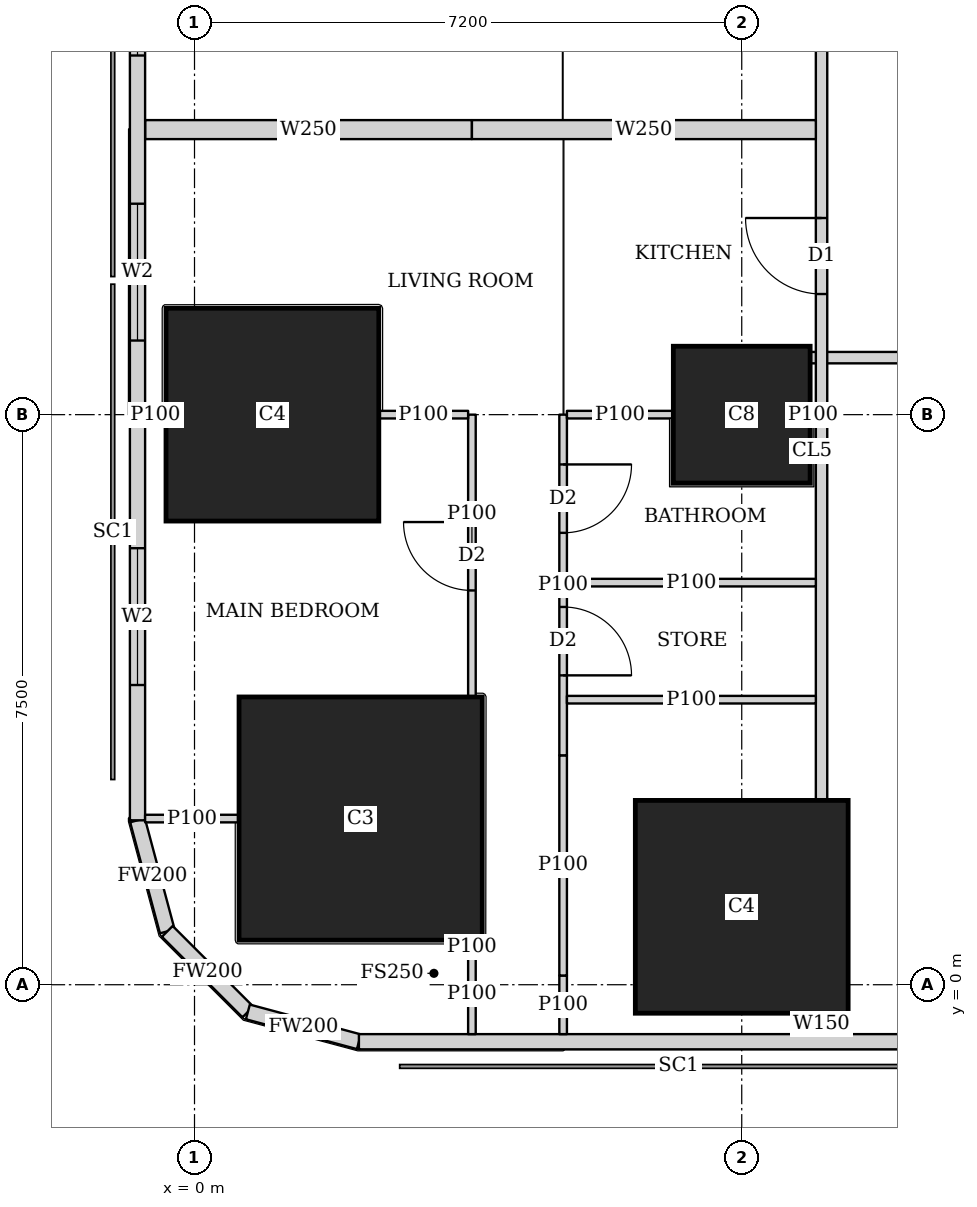
"""IFC4 building model, lengths in metres.
Left out: names, types, materials, properties, quantities, classifications, styles, units other than length and angle.
Written with IfcOpenShell. Run it as: python <this file> out.ifc"""

import sys

from ifc_helpers import new_model, si_unit, direction, frame, frame_2d, origin, origin_2d, place, context, subcontext, project, spatial, rectangle, extrude, element, fill, save


model = new_model("IFC4")
c1 = context("Model", 3, precision=1e-05, world=origin(), true_north=direction((0.0, 1.0)))
c2 = subcontext(c1, "Body", "Model", "MODEL_VIEW")
j1 = project(units=[si_unit("LENGTHUNIT", "METRE"), si_unit("PLANEANGLEUNIT", "RADIAN")], contexts=[c1])
p1 = place(None, origin())
s1 = spatial("IfcSite", under=j1, at=p1, CompositionType="ELEMENT")
p2 = place(p1, origin())
s2 = spatial("IfcBuilding", under=s1, at=p2, CompositionType="ELEMENT")
p3 = place(p2, frame((0.0, 0.0, 53.75)))
s3 = spatial("IfcBuildingStorey", under=s2, at=p3, CompositionType="ELEMENT", Elevation=53.75)
p4 = place(p3, frame((7.2, 1.025, 0.0), z_axis=(0.0, 0.0, 1.0), x_axis=(1.0, 0.0, 0.0)))
e1 = element("IfcColumn", 1, at=p4, inside=s3, PredefinedType="COLUMN", context=c2, shape_type="SweptSolid", body=[
    extrude(rectangle(XDim=2.8, YDim=2.8, at=origin_2d()), origin(), (0.0, 0.0, 1.0), 3.75),
])
p5 = place(p3, frame((2.186, 2.186, 0.0), z_axis=(0.0, 0.0, 1.0), x_axis=(1.0, 0.0, 0.0)))
e2 = element("IfcColumn", 2, at=p5, inside=s3, PredefinedType="COLUMN", context=c2, shape_type="SweptSolid", body=[
    extrude(rectangle(XDim=3.2, YDim=3.2, at=origin_2d()), origin(), (0.0, 0.0, 1.0), 3.75),
])
p6 = place(p3, frame((1.025, 7.5, 0.0), z_axis=(0.0, 0.0, 1.0), x_axis=(1.0, 0.0, 0.0)))
e3 = element("IfcColumn", 3, at=p6, inside=s3, PredefinedType="COLUMN", context=c2, shape_type="SweptSolid", body=[
    extrude(rectangle(XDim=2.8, YDim=2.8, at=origin_2d()), origin(), (0.0, 0.0, 1.0), 3.75),
])
p7 = place(p3, frame((7.2, 7.5, 0.0), z_axis=(0.0, 0.0, 1.0), x_axis=(1.0, 0.0, 0.0)))
e4 = element("IfcColumn", 4, at=p7, inside=s3, PredefinedType="COLUMN", context=c2, shape_type="SweptSolid", body=[
    extrude(rectangle(XDim=1.8, YDim=1.8, at=origin_2d()), origin(), (0.0, 0.0, 1.0), 3.75),
])
p8 = place(p3, frame((2.163, -0.75, 0.0), z_axis=(0.0, 0.0, 1.0), x_axis=(1.0, 0.0, 0.0)))
e5 = element("IfcWall", 5, at=p8, inside=s3, PredefinedType="SOLIDWALL", context=c2, shape_type="SweptSolid", body=[
    extrude(rectangle(XDim=45.628, YDim=0.2, at=frame_2d((22.814, 0.0))), origin(), (0.0, 0.0, 1.0), 3.5),
])
p9 = place(p8, frame((9.537, 0.0, 0.9)))
e6 = element("IfcOpeningElement", 6, at=p9, cuts=e5, PredefinedType="OPENING", context=c2, shape_type="SweptSolid", body=[
    extrude(rectangle(XDim=1.8, YDim=1.5, at=frame_2d((0.9, 0.75))), frame((0.0, 0.11, 0.0), z_axis=(0.0, -1.0, 0.0), x_axis=(1.0, 0.0, 0.0)), (0.0, 0.0, 1.0), 0.22),
])
p10 = place(p8, frame((13.137, 0.0, 0.9)))
e7 = element("IfcOpeningElement", 7, at=p10, cuts=e5, PredefinedType="OPENING", context=c2, shape_type="SweptSolid", body=[
    extrude(rectangle(XDim=1.8, YDim=1.5, at=frame_2d((0.9, 0.75))), frame((0.0, 0.11, 0.0), z_axis=(0.0, -1.0, 0.0), x_axis=(1.0, 0.0, 0.0)), (0.0, 0.0, 1.0), 0.22),
])
p11 = place(p8, frame((16.737, 0.0, 0.9)))
e8 = element("IfcOpeningElement", 8, at=p11, cuts=e5, PredefinedType="OPENING", context=c2, shape_type="SweptSolid", body=[
    extrude(rectangle(XDim=1.8, YDim=1.5, at=frame_2d((0.9, 0.75))), frame((0.0, 0.11, 0.0), z_axis=(0.0, -1.0, 0.0), x_axis=(1.0, 0.0, 0.0)), (0.0, 0.0, 1.0), 0.22),
])
p12 = place(p8, frame((20.337, 0.0, 0.9)))
e9 = element("IfcOpeningElement", 9, at=p12, cuts=e5, PredefinedType="OPENING", context=c2, shape_type="SweptSolid", body=[
    extrude(rectangle(XDim=1.8, YDim=1.5, at=frame_2d((0.9, 0.75))), frame((0.0, 0.11, 0.0), z_axis=(0.0, -1.0, 0.0), x_axis=(1.0, 0.0, 0.0)), (0.0, 0.0, 1.0), 0.22),
])
p13 = place(p8, frame((23.937, 0.0, 0.9)))
e10 = element("IfcOpeningElement", 10, at=p13, cuts=e5, PredefinedType="OPENING", context=c2, shape_type="SweptSolid", body=[
    extrude(rectangle(XDim=1.8, YDim=1.5, at=frame_2d((0.9, 0.75))), frame((0.0, 0.11, 0.0), z_axis=(0.0, -1.0, 0.0), x_axis=(1.0, 0.0, 0.0)), (0.0, 0.0, 1.0), 0.22),
])
p14 = place(p8, frame((27.537, 0.0, 0.9)))
e11 = element("IfcOpeningElement", 11, at=p14, cuts=e5, PredefinedType="OPENING", context=c2, shape_type="SweptSolid", body=[
    extrude(rectangle(XDim=1.8, YDim=1.5, at=frame_2d((0.9, 0.75))), frame((0.0, 0.11, 0.0), z_axis=(0.0, -1.0, 0.0), x_axis=(1.0, 0.0, 0.0)), (0.0, 0.0, 1.0), 0.22),
])
p15 = place(p8, frame((31.137, 0.0, 0.9)))
e12 = element("IfcOpeningElement", 12, at=p15, cuts=e5, PredefinedType="OPENING", context=c2, shape_type="SweptSolid", body=[
    extrude(rectangle(XDim=1.8, YDim=1.5, at=frame_2d((0.9, 0.75))), frame((0.0, 0.11, 0.0), z_axis=(0.0, -1.0, 0.0), x_axis=(1.0, 0.0, 0.0)), (0.0, 0.0, 1.0), 0.22),
])
p16 = place(p8, frame((34.737, 0.0, 0.9)))
e13 = element("IfcOpeningElement", 13, at=p16, cuts=e5, PredefinedType="OPENING", context=c2, shape_type="SweptSolid", body=[
    extrude(rectangle(XDim=1.8, YDim=1.5, at=frame_2d((0.9, 0.75))), frame((0.0, 0.11, 0.0), z_axis=(0.0, -1.0, 0.0), x_axis=(1.0, 0.0, 0.0)), (0.0, 0.0, 1.0), 0.22),
])
p17 = place(p3, frame((-0.75, 42.837, 0.0), z_axis=(0.0, 0.0, 1.0), x_axis=(0.0, -1.0, 0.0)))
e14 = element("IfcWall", 14, at=p17, inside=s3, PredefinedType="SOLIDWALL", context=c2, shape_type="SweptSolid", body=[
    extrude(rectangle(XDim=40.674, YDim=0.2, at=frame_2d((20.337, 0.0))), origin(), (0.0, 0.0, 1.0), 3.5),
])
p18 = place(p17, frame((1.78, 0.0, 0.9)))
e15 = element("IfcOpeningElement", 15, at=p18, cuts=e14, PredefinedType="OPENING", context=c2, shape_type="SweptSolid", body=[
    extrude(rectangle(XDim=1.8, YDim=1.5, at=frame_2d((0.9, 0.75))), frame((0.0, 0.11, 0.0), z_axis=(0.0, -1.0, 0.0), x_axis=(1.0, 0.0, 0.0)), (0.0, 0.0, 1.0), 0.22),
])
p19 = place(p17, frame((6.312, 0.0, 0.9)))
e16 = element("IfcOpeningElement", 16, at=p19, cuts=e14, PredefinedType="OPENING", context=c2, shape_type="SweptSolid", body=[
    extrude(rectangle(XDim=1.8, YDim=1.5, at=frame_2d((0.9, 0.75))), frame((0.0, 0.11, 0.0), z_axis=(0.0, -1.0, 0.0), x_axis=(1.0, 0.0, 0.0)), (0.0, 0.0, 1.0), 0.22),
])
p20 = place(p17, frame((10.062, 0.0, 0.9)))
e17 = element("IfcOpeningElement", 17, at=p20, cuts=e14, PredefinedType="OPENING", context=c2, shape_type="SweptSolid", body=[
    extrude(rectangle(XDim=1.8, YDim=1.5, at=frame_2d((0.9, 0.75))), frame((0.0, 0.11, 0.0), z_axis=(0.0, -1.0, 0.0), x_axis=(1.0, 0.0, 0.0)), (0.0, 0.0, 1.0), 0.22),
])
p21 = place(p17, frame((13.812, 0.0, 0.9)))
e18 = element("IfcOpeningElement", 18, at=p21, cuts=e14, PredefinedType="OPENING", context=c2, shape_type="SweptSolid", body=[
    extrude(rectangle(XDim=1.8, YDim=1.5, at=frame_2d((0.9, 0.75))), frame((0.0, 0.11, 0.0), z_axis=(0.0, -1.0, 0.0), x_axis=(1.0, 0.0, 0.0)), (0.0, 0.0, 1.0), 0.22),
])
p22 = place(p17, frame((17.562, 0.0, 0.9)))
e19 = element("IfcOpeningElement", 19, at=p22, cuts=e14, PredefinedType="OPENING", context=c2, shape_type="SweptSolid", body=[
    extrude(rectangle(XDim=1.8, YDim=1.5, at=frame_2d((0.9, 0.75))), frame((0.0, 0.11, 0.0), z_axis=(0.0, -1.0, 0.0), x_axis=(1.0, 0.0, 0.0)), (0.0, 0.0, 1.0), 0.22),
])
p23 = place(p17, frame((21.312, 0.0, 0.9)))
e20 = element("IfcOpeningElement", 20, at=p23, cuts=e14, PredefinedType="OPENING", context=c2, shape_type="SweptSolid", body=[
    extrude(rectangle(XDim=1.8, YDim=1.5, at=frame_2d((0.9, 0.75))), frame((0.0, 0.11, 0.0), z_axis=(0.0, -1.0, 0.0), x_axis=(1.0, 0.0, 0.0)), (0.0, 0.0, 1.0), 0.22),
])
p24 = place(p17, frame((25.062, 0.0, 0.9)))
e21 = element("IfcOpeningElement", 21, at=p24, cuts=e14, PredefinedType="OPENING", context=c2, shape_type="SweptSolid", body=[
    extrude(rectangle(XDim=1.8, YDim=1.5, at=frame_2d((0.9, 0.75))), frame((0.0, 0.11, 0.0), z_axis=(0.0, -1.0, 0.0), x_axis=(1.0, 0.0, 0.0)), (0.0, 0.0, 1.0), 0.22),
])
p25 = place(p17, frame((28.812, 0.0, 0.9)))
e22 = element("IfcOpeningElement", 22, at=p25, cuts=e14, PredefinedType="OPENING", context=c2, shape_type="SweptSolid", body=[
    extrude(rectangle(XDim=1.8, YDim=1.5, at=frame_2d((0.9, 0.75))), frame((0.0, 0.11, 0.0), z_axis=(0.0, -1.0, 0.0), x_axis=(1.0, 0.0, 0.0)), (0.0, 0.0, 1.0), 0.22),
])
p26 = place(p17, frame((32.562, 0.0, 0.9)))
e23 = element("IfcOpeningElement", 23, at=p26, cuts=e14, PredefinedType="OPENING", context=c2, shape_type="SweptSolid", body=[
    extrude(rectangle(XDim=1.8, YDim=1.5, at=frame_2d((0.9, 0.75))), frame((0.0, 0.11, 0.0), z_axis=(0.0, -1.0, 0.0), x_axis=(1.0, 0.0, 0.0)), (0.0, 0.0, 1.0), 0.22),
])
p27 = place(p17, frame((37.094, 0.0, 0.9)))
e24 = element("IfcOpeningElement", 24, at=p27, cuts=e14, PredefinedType="OPENING", context=c2, shape_type="SweptSolid", body=[
    extrude(rectangle(XDim=1.8, YDim=1.5, at=frame_2d((0.9, 0.75))), frame((0.0, 0.11, 0.0), z_axis=(0.0, -1.0, 0.0), x_axis=(1.0, 0.0, 0.0)), (0.0, 0.0, 1.0), 0.22),
])
p28 = place(p3, frame((-0.75, 2.163, 0.0), z_axis=(0.0, 0.0, 1.0), x_axis=(0.259168954497, -0.965832000415, 0.0)))
e25 = element("IfcWall", 25, at=p28, inside=s3, PredefinedType="SOLIDWALL", context=c2, shape_type="SweptSolid", body=[
    extrude(rectangle(XDim=1.513, YDim=0.2, at=frame_2d((0.756, 0.0))), origin(), (0.0, 0.0, 1.0), 3.5),
])
p29 = place(p3, frame((-0.358, 0.702, 0.0), z_axis=(0.0, 0.0, 1.0), x_axis=(0.707106781187, -0.707106781187, 0.0)))
e26 = element("IfcWall", 26, at=p29, inside=s3, PredefinedType="SOLIDWALL", context=c2, shape_type="SweptSolid", body=[
    extrude(rectangle(XDim=1.499, YDim=0.2, at=frame_2d((0.75, 0.0))), origin(), (0.0, 0.0, 1.0), 3.5),
])
p30 = place(p3, frame((0.702, -0.358, 0.0), z_axis=(0.0, 0.0, 1.0), x_axis=(0.965832000415, -0.259168954497, 0.0)))
e27 = element("IfcWall", 27, at=p30, inside=s3, PredefinedType="SOLIDWALL", context=c2, shape_type="SweptSolid", body=[
    extrude(rectangle(XDim=1.513, YDim=0.2, at=frame_2d((0.756, 0.0))), origin(), (0.0, 0.0, 1.0), 3.5),
])
p31 = place(p3, frame((8.25, -0.65, 0.0), z_axis=(0.0, 0.0, 1.0), x_axis=(0.0, 1.0, 0.0)))
e28 = element("IfcWall", 28, at=p31, inside=s3, PredefinedType="SOLIDWALL", context=c2, shape_type="SweptSolid", body=[
    extrude(rectangle(XDim=0.274, YDim=0.15, at=frame_2d((0.137, 0.0))), origin(), (0.0, 0.0, 1.0), 3.5),
])
p32 = place(p3, frame((8.25, 2.426, 0.0), z_axis=(0.0, 0.0, 1.0), x_axis=(0.0, 1.0, 0.0)))
e29 = element("IfcWall", 29, at=p32, inside=s3, PredefinedType="SOLIDWALL", context=c2, shape_type="SweptSolid", body=[
    extrude(rectangle(XDim=40.173, YDim=0.15, at=frame_2d((20.086, 0.0))), origin(), (0.0, 0.0, 1.0), 3.5),
])
p33 = place(p32, frame((6.661, 0.0, 0.0)))
e30 = element("IfcOpeningElement", 30, at=p33, cuts=e29, PredefinedType="OPENING", context=c2, shape_type="SweptSolid", body=[
    extrude(rectangle(XDim=1.0, YDim=2.1, at=frame_2d((0.5, 1.05))), frame((0.0, 0.085, 0.0), z_axis=(0.0, -1.0, 0.0), x_axis=(1.0, 0.0, 0.0)), (0.0, 0.0, 1.0), 0.17),
])
p34 = place(p32, frame((9.986, 0.0, 0.0)))
e31 = element("IfcOpeningElement", 31, at=p34, cuts=e29, PredefinedType="OPENING", context=c2, shape_type="SweptSolid", body=[
    extrude(rectangle(XDim=1.0, YDim=2.1, at=frame_2d((0.5, 1.05))), frame((0.0, 0.085, 0.0), z_axis=(0.0, -1.0, 0.0), x_axis=(1.0, 0.0, 0.0)), (0.0, 0.0, 1.0), 0.17),
])
p35 = place(p32, frame((21.662, 0.0, 0.0)))
e32 = element("IfcOpeningElement", 32, at=p35, cuts=e29, PredefinedType="OPENING", context=c2, shape_type="SweptSolid", body=[
    extrude(rectangle(XDim=1.0, YDim=2.1, at=frame_2d((0.5, 1.05))), frame((0.0, 0.085, 0.0), z_axis=(0.0, -1.0, 0.0), x_axis=(1.0, 0.0, 0.0)), (0.0, 0.0, 1.0), 0.17),
])
p36 = place(p32, frame((29.161, 0.0, 0.0)))
e33 = element("IfcOpeningElement", 33, at=p36, cuts=e29, PredefinedType="OPENING", context=c2, shape_type="SweptSolid", body=[
    extrude(rectangle(XDim=1.0, YDim=2.1, at=frame_2d((0.5, 1.05))), frame((0.0, 0.085, 0.0), z_axis=(0.0, -1.0, 0.0), x_axis=(1.0, 0.0, 0.0)), (0.0, 0.0, 1.0), 0.17),
])
p37 = place(p3, frame((13.499, 8.25, 0.0), z_axis=(0.0, 0.0, 1.0), x_axis=(-1.0, 0.0, 0.0)))
e34 = element("IfcWall", 34, at=p37, inside=s3, PredefinedType="SOLIDWALL", context=c2, shape_type="SweptSolid", body=[
    extrude(rectangle(XDim=5.399, YDim=0.15, at=frame_2d((2.699, 0.0))), origin(), (0.0, 0.0, 1.0), 3.5),
])
p38 = place(p37, frame((1.674, 0.0, 0.0)))
e35 = element("IfcOpeningElement", 35, at=p38, cuts=e34, PredefinedType="OPENING", context=c2, shape_type="SweptSolid", body=[
    extrude(rectangle(XDim=1.0, YDim=2.1, at=frame_2d((0.5, 1.05))), frame((0.0, 0.085, 0.0), z_axis=(0.0, -1.0, 0.0), x_axis=(1.0, 0.0, 0.0)), (0.0, 0.0, 1.0), 0.17),
])
p39 = place(p3, frame((3.65, -0.65, 0.0), z_axis=(0.0, 0.0, 1.0), x_axis=(0.0, 1.0, 0.0)))
e36 = element("IfcWall", 36, at=p39, inside=s3, PredefinedType="PARTITIONING", context=c2, shape_type="SweptSolid", body=[
    extrude(rectangle(XDim=1.048, YDim=0.1, at=frame_2d((0.524, 0.0))), origin(), (0.0, 0.0, 1.0), 3.5),
])
p40 = place(p3, frame((3.65, 0.398, 0.0), z_axis=(0.0, 0.0, 1.0), x_axis=(0.0, 1.0, 0.0)))
e37 = element("IfcWall", 37, at=p40, inside=s3, PredefinedType="PARTITIONING", context=c2, shape_type="SweptSolid", body=[
    extrude(rectangle(XDim=0.187, YDim=0.1, at=frame_2d((0.094, 0.0))), origin(), (0.0, 0.0, 1.0), 2.05),
])
p41 = place(p3, frame((3.65, 3.787, 0.0), z_axis=(0.0, 0.0, 1.0), x_axis=(0.0, 1.0, 0.0)))
e38 = element("IfcWall", 38, at=p41, inside=s3, PredefinedType="PARTITIONING", context=c2, shape_type="SweptSolid", body=[
    extrude(rectangle(XDim=3.713, YDim=0.1, at=frame_2d((1.856, 0.0))), origin(), (0.0, 0.0, 1.0), 3.5),
])
p42 = place(p41, frame((1.4, 0.0, 0.0)))
e39 = element("IfcOpeningElement", 39, at=p42, cuts=e38, PredefinedType="OPENING", context=c2, shape_type="SweptSolid", body=[
    extrude(rectangle(XDim=0.9, YDim=2.1, at=frame_2d((0.45, 1.05))), frame((0.0, 0.06, 0.0), z_axis=(0.0, -1.0, 0.0), x_axis=(1.0, 0.0, 0.0)), (0.0, 0.0, 1.0), 0.12),
])
p43 = place(p3, frame((4.85, -0.65, 0.0), z_axis=(0.0, 0.0, 1.0), x_axis=(0.0, 1.0, 0.0)))
e40 = element("IfcWall", 40, at=p43, inside=s3, PredefinedType="PARTITIONING", context=c2, shape_type="SweptSolid", body=[
    extrude(rectangle(XDim=0.771, YDim=0.1, at=frame_2d((0.385, 0.0))), origin(), (0.0, 0.0, 1.0), 3.5),
])
p44 = place(p3, frame((4.85, 0.121, 0.0), z_axis=(0.0, 0.0, 1.0), x_axis=(0.0, 1.0, 0.0)))
e41 = element("IfcWall", 41, at=p44, inside=s3, PredefinedType="PARTITIONING", context=c2, shape_type="SweptSolid", body=[
    extrude(rectangle(XDim=2.897, YDim=0.1, at=frame_2d((1.448, 0.0))), origin(), (0.0, 0.0, 1.0), 2.05),
])
p45 = place(p3, frame((4.85, 3.018, 0.0), z_axis=(0.0, 0.0, 1.0), x_axis=(0.0, 1.0, 0.0)))
e42 = element("IfcWall", 42, at=p45, inside=s3, PredefinedType="PARTITIONING", context=c2, shape_type="SweptSolid", body=[
    extrude(rectangle(XDim=4.482, YDim=0.1, at=frame_2d((2.241, 0.0))), origin(), (0.0, 0.0, 1.0), 3.5),
])
p46 = place(p45, frame((2.927, 0.0, 0.0)))
e43 = element("IfcOpeningElement", 43, at=p46, cuts=e42, PredefinedType="OPENING", context=c2, shape_type="SweptSolid", body=[
    extrude(rectangle(XDim=0.9, YDim=2.1, at=frame_2d((0.45, 1.05))), frame((0.0, 0.06, 0.0), z_axis=(0.0, -1.0, 0.0), x_axis=(1.0, 0.0, 0.0)), (0.0, 0.0, 1.0), 0.12),
])
p47 = place(p45, frame((1.052, 0.0, 0.0)))
e44 = element("IfcOpeningElement", 44, at=p47, cuts=e42, PredefinedType="OPENING", context=c2, shape_type="SweptSolid", body=[
    extrude(rectangle(XDim=0.9, YDim=2.1, at=frame_2d((0.45, 1.05))), frame((0.0, 0.06, 0.0), z_axis=(0.0, -1.0, 0.0), x_axis=(1.0, 0.0, 0.0)), (0.0, 0.0, 1.0), 0.12),
])
p48 = place(p3, frame((-0.65, 2.186, 0.0), z_axis=(0.0, 0.0, 1.0), x_axis=(1.0, 0.0, 0.0)))
e45 = element("IfcWall", 45, at=p48, inside=s3, PredefinedType="PARTITIONING", context=c2, shape_type="SweptSolid", body=[
    extrude(rectangle(XDim=1.235, YDim=0.1, at=frame_2d((0.617, 0.0))), origin(), (0.0, 0.0, 1.0), 3.5),
])
p49 = place(p3, frame((-0.65, 7.5, 0.0), z_axis=(0.0, 0.0, 1.0), x_axis=(1.0, 0.0, 0.0)))
e46 = element("IfcWall", 46, at=p49, inside=s3, PredefinedType="PARTITIONING", context=c2, shape_type="SweptSolid", body=[
    extrude(rectangle(XDim=0.274, YDim=0.1, at=frame_2d((0.137, 0.0))), origin(), (0.0, 0.0, 1.0), 3.5),
])
p50 = place(p3, frame((2.426, 7.5, 0.0), z_axis=(0.0, 0.0, 1.0), x_axis=(1.0, 0.0, 0.0)))
e47 = element("IfcWall", 47, at=p50, inside=s3, PredefinedType="PARTITIONING", context=c2, shape_type="SweptSolid", body=[
    extrude(rectangle(XDim=1.174, YDim=0.1, at=frame_2d((0.587, 0.0))), origin(), (0.0, 0.0, 1.0), 2.05),
])
p51 = place(p3, frame((4.9, 3.75, 0.0), z_axis=(0.0, 0.0, 1.0), x_axis=(1.0, 0.0, 0.0)))
e48 = element("IfcWall", 48, at=p51, inside=s3, PredefinedType="PARTITIONING", context=c2, shape_type="SweptSolid", body=[
    extrude(rectangle(XDim=3.275, YDim=0.1, at=frame_2d((1.638, 0.0))), origin(), (0.0, 0.0, 1.0), 3.5),
])
p52 = place(p3, frame((4.9, 7.5, 0.0), z_axis=(0.0, 0.0, 1.0), x_axis=(1.0, 0.0, 0.0)))
e49 = element("IfcWall", 49, at=p52, inside=s3, PredefinedType="PARTITIONING", context=c2, shape_type="SweptSolid", body=[
    extrude(rectangle(XDim=1.399, YDim=0.1, at=frame_2d((0.7, 0.0))), origin(), (0.0, 0.0, 1.0), 3.5),
])
p53 = place(p3, frame((8.101, 7.5, 0.0), z_axis=(0.0, 0.0, 1.0), x_axis=(1.0, 0.0, 0.0)))
e50 = element("IfcWall", 50, at=p53, inside=s3, PredefinedType="PARTITIONING", context=c2, shape_type="SweptSolid", body=[
    extrude(rectangle(XDim=0.074, YDim=0.1, at=frame_2d((0.037, 0.0))), origin(), (0.0, 0.0, 1.0), 3.5),
])
p54 = place(p3, frame((4.9, 5.29, 0.0), z_axis=(0.0, 0.0, 1.0), x_axis=(1.0, 0.0, 0.0)))
e51 = element("IfcWall", 51, at=p54, inside=s3, PredefinedType="PARTITIONING", context=c2, shape_type="SweptSolid", body=[
    extrude(rectangle(XDim=3.275, YDim=0.1, at=frame_2d((1.638, 0.0))), origin(), (0.0, 0.0, 1.0), 3.5),
])
p55 = place(p3, frame((-0.65, 11.25, 0.0), z_axis=(0.0, 0.0, 1.0), x_axis=(1.0, 0.0, 0.0)))
e52 = element("IfcWall", 52, at=p55, inside=s3, PredefinedType="SOLIDWALL", context=c2, shape_type="SweptSolid", body=[
    extrude(rectangle(XDim=4.3, YDim=0.25, at=frame_2d((2.15, 0.0))), origin(), (0.0, 0.0, 1.0), 2.05),
])
p56 = place(p3, frame((3.65, 11.25, 0.0), z_axis=(0.0, 0.0, 1.0), x_axis=(1.0, 0.0, 0.0)))
e53 = element("IfcWall", 53, at=p56, inside=s3, PredefinedType="SOLIDWALL", context=c2, shape_type="SweptSolid", body=[
    extrude(rectangle(XDim=4.525, YDim=0.25, at=frame_2d((2.263, 0.0))), origin(), (0.0, 0.0, 1.0), 3.5),
])
p57 = place(p25, origin())
e54 = element("IfcWindow", 54, at=p57, inside=s3, PartitioningType="SINGLE_PANEL", PredefinedType="WINDOW", context=c2, shape_type="SweptSolid", body=[
    extrude(rectangle(XDim=1.8, YDim=1.5, at=frame_2d((0.9, 0.75))), frame((0.0, 0.03, 0.0), z_axis=(0.0, -1.0, 0.0), x_axis=(1.0, 0.0, 0.0)), (0.0, 0.0, 1.0), 0.06),
])
fill(e22, e54)
p58 = place(p26, origin())
e55 = element("IfcWindow", 55, at=p58, inside=s3, PartitioningType="SINGLE_PANEL", PredefinedType="WINDOW", context=c2, shape_type="SweptSolid", body=[
    extrude(rectangle(XDim=1.8, YDim=1.5, at=frame_2d((0.9, 0.75))), frame((0.0, 0.03, 0.0), z_axis=(0.0, -1.0, 0.0), x_axis=(1.0, 0.0, 0.0)), (0.0, 0.0, 1.0), 0.06),
])
fill(e23, e55)
p59 = place(p27, origin())
e56 = element("IfcWindow", 56, at=p59, inside=s3, PartitioningType="SINGLE_PANEL", PredefinedType="WINDOW", context=c2, shape_type="SweptSolid", body=[
    extrude(rectangle(XDim=1.8, YDim=1.5, at=frame_2d((0.9, 0.75))), frame((0.0, 0.03, 0.0), z_axis=(0.0, -1.0, 0.0), x_axis=(1.0, 0.0, 0.0)), (0.0, 0.0, 1.0), 0.06),
])
fill(e24, e56)
p60 = place(p42, origin())
e57 = element("IfcDoor", 57, at=p60, inside=s3, OperationType="SINGLE_SWING_RIGHT", PredefinedType="DOOR", context=c2, shape_type="SweptSolid", body=[
    extrude(rectangle(XDim=0.9, YDim=2.1, at=frame_2d((0.45, 1.05))), frame((0.0, 0.025, 0.0), z_axis=(0.0, -1.0, 0.0), x_axis=(1.0, 0.0, 0.0)), (0.0, 0.0, 1.0), 0.05),
])
fill(e39, e57)
p61 = place(p46, origin())
e58 = element("IfcDoor", 58, at=p61, inside=s3, OperationType="SINGLE_SWING_LEFT", PredefinedType="DOOR", context=c2, shape_type="SweptSolid", body=[
    extrude(rectangle(XDim=0.9, YDim=2.1, at=frame_2d((0.45, 1.05))), frame((0.0, 0.025, 0.0), z_axis=(0.0, -1.0, 0.0), x_axis=(1.0, 0.0, 0.0)), (0.0, 0.0, 1.0), 0.05),
])
fill(e43, e58)
p62 = place(p47, origin())
e59 = element("IfcDoor", 59, at=p62, inside=s3, OperationType="SINGLE_SWING_RIGHT", PredefinedType="DOOR", context=c2, shape_type="SweptSolid", body=[
    extrude(rectangle(XDim=0.9, YDim=2.1, at=frame_2d((0.45, 1.05))), frame((0.0, 0.025, 0.0), z_axis=(0.0, -1.0, 0.0), x_axis=(1.0, 0.0, 0.0)), (0.0, 0.0, 1.0), 0.05),
])
fill(e44, e59)
p63 = place(p33, origin())
e60 = element("IfcDoor", 60, at=p63, inside=s3, OperationType="SINGLE_SWING_RIGHT", PredefinedType="DOOR", context=c2, shape_type="SweptSolid", body=[
    extrude(rectangle(XDim=1.0, YDim=2.1, at=frame_2d((0.5, 1.05))), frame((0.0, 0.025, 0.0), z_axis=(0.0, -1.0, 0.0), x_axis=(1.0, 0.0, 0.0)), (0.0, 0.0, 1.0), 0.05),
])
fill(e30, e60)
save(model, sys.argv[1])
